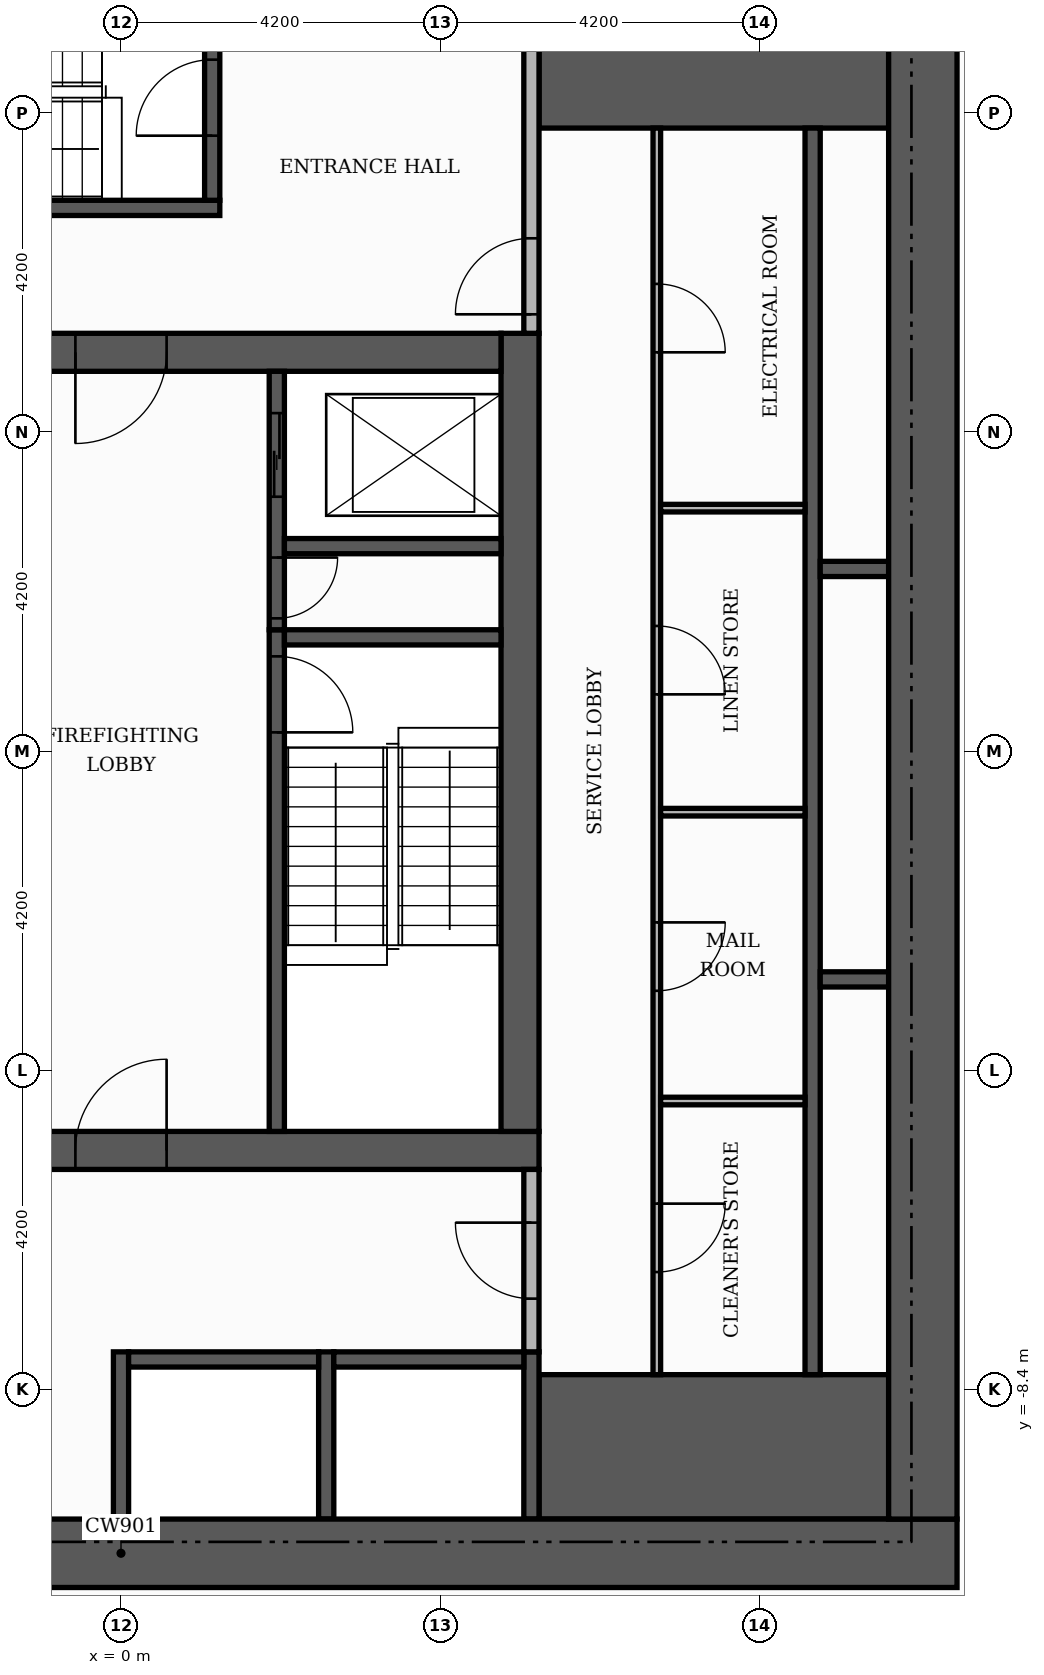
"""IFC4 building model, lengths in metres.
Left out: names, types, materials, properties, quantities, classifications, styles, units other than length and angle.
Written with IfcOpenShell. Run it as: python <this file> out.ifc"""

import sys

from ifc_helpers import new_model, si_unit, direction, frame, frame_2d, origin, place, context, subcontext, project, spatial, rectangle, extrude, element, fill, save


model = new_model("IFC4")
c1 = context("Model", 3, precision=1e-05, world=origin(), true_north=direction((0.0, 1.0)))
c2 = subcontext(c1, "Body", "Model", "MODEL_VIEW")
j1 = project(units=[si_unit("LENGTHUNIT", "METRE"), si_unit("PLANEANGLEUNIT", "RADIAN")], contexts=[c1])
p1 = place(None, origin())
s1 = spatial("IfcSite", under=j1, at=p1, CompositionType="ELEMENT")
p2 = place(p1, origin())
s2 = spatial("IfcBuilding", under=s1, at=p2, CompositionType="ELEMENT")
p3 = place(p2, frame((0.0, 0.0, 30.9)))
s3 = spatial("IfcBuildingStorey", under=s2, at=p3, CompositionType="ELEMENT", Elevation=30.9)
p4 = place(p3, frame((-5.5, -5.25, 0.0), z_axis=(0.0, 0.0, 1.0), x_axis=(1.0, 0.0, 0.0)))
e1 = element("IfcWall", 1, at=p4, inside=s3, PredefinedType="SHEAR", context=c2, shape_type="SweptSolid", body=[
    extrude(rectangle(XDim=11.0, YDim=0.5, at=frame_2d((5.5, 0.0))), origin(), (0.0, 0.0, 1.0), 3.48),
])
p5 = place(p4, frame((4.9, 0.0, 0.0)))
e2 = element("IfcOpeningElement", 2, at=p5, cuts=e1, PredefinedType="OPENING", context=c2, shape_type="SweptSolid", body=[
    extrude(rectangle(XDim=1.2, YDim=2.1, at=frame_2d((0.6, 1.05))), frame((0.0, 0.26, 0.0), z_axis=(0.0, -1.0, 0.0), x_axis=(1.0, 0.0, 0.0)), (0.0, 0.0, 1.0), 0.52),
])
p6 = place(p3, frame((5.25, -5.0, 0.0), z_axis=(0.0, 0.0, 1.0), x_axis=(0.0, 1.0, 0.0)))
e3 = element("IfcWall", 3, at=p6, inside=s3, PredefinedType="SHEAR", context=c2, shape_type="SweptSolid", body=[
    extrude(rectangle(XDim=10.5, YDim=0.5, at=frame_2d((5.25, 0.0))), origin(), (0.0, 0.0, 1.0), 3.48),
])
p7 = place(p3, frame((-5.0, 5.25, 0.0), z_axis=(0.0, 0.0, 1.0), x_axis=(1.0, 0.0, 0.0)))
e4 = element("IfcWall", 4, at=p7, inside=s3, PredefinedType="SHEAR", context=c2, shape_type="SweptSolid", body=[
    extrude(rectangle(XDim=10.0, YDim=0.5, at=frame_2d((5.0, 0.0))), origin(), (0.0, 0.0, 1.0), 3.48),
])
p8 = place(p7, frame((4.4, 0.0, 0.0)))
e5 = element("IfcOpeningElement", 5, at=p8, cuts=e4, PredefinedType="OPENING", context=c2, shape_type="SweptSolid", body=[
    extrude(rectangle(XDim=1.2, YDim=2.1, at=frame_2d((0.6, 1.05))), frame((0.0, 0.26, 0.0), z_axis=(0.0, -1.0, 0.0), x_axis=(1.0, 0.0, 0.0)), (0.0, 0.0, 1.0), 0.52),
])
for number, where, z_axis, x_axis in (
    (6, (5.5, -9.15, 0.0), (0.0, 0.0, 1.0), (1.0, 0.0, 0.0)),
    (7, (5.5, 9.15, 0.0), (0.0, 0.0, 1.0), (1.0, 0.0, 0.0)),
):
    element("IfcWall", number, at=place(p3, frame(where, z_axis=z_axis, x_axis=x_axis)), inside=s3, PredefinedType="SHEAR", context=c2, shape_type="SweptSolid", body=[
        extrude(rectangle(XDim=4.6, YDim=1.9, at=frame_2d((2.3, 0.0))), origin(), (0.0, 0.0, 1.0), 3.48),
    ])
p9 = place(p3, frame((2.05, -5.0, 0.0), z_axis=(0.0, 0.0, 1.0), x_axis=(0.0, 1.0, 0.0)))
e8 = element("IfcWall", 8, at=p9, inside=s3, PredefinedType="SHEAR", context=c2, shape_type="SweptSolid", body=[
    extrude(rectangle(XDim=6.6, YDim=0.2, at=frame_2d((3.3, 0.0))), origin(), (0.0, 0.0, 1.0), 3.48),
])
p10 = place(p9, frame((5.25, 0.0, 0.0)))
e9 = element("IfcOpeningElement", 9, at=p10, cuts=e8, PredefinedType="OPENING", context=c2, shape_type="SweptSolid", body=[
    extrude(rectangle(XDim=1.0, YDim=2.1, at=frame_2d((0.5, 1.05))), frame((0.0, 0.11, 0.0), z_axis=(0.0, -1.0, 0.0), x_axis=(1.0, 0.0, 0.0)), (0.0, 0.0, 1.0), 0.22),
])
p11 = place(p3, frame((2.15, 1.5, 0.0), z_axis=(0.0, 0.0, 1.0), x_axis=(1.0, 0.0, 0.0)))
e10 = element("IfcWall", 10, at=p11, inside=s3, PredefinedType="SHEAR", context=c2, shape_type="SweptSolid", body=[
    extrude(rectangle(XDim=2.85, YDim=0.2, at=frame_2d((1.425, 0.0))), origin(), (0.0, 0.0, 1.0), 3.48),
])
p12 = place(p3, frame((-5.5, 7.15, 0.0), z_axis=(0.0, 0.0, 1.0), x_axis=(1.0, 0.0, 0.0)))
e11 = element("IfcWall", 11, at=p12, inside=s3, PredefinedType="SHEAR", context=c2, shape_type="SweptSolid", body=[
    extrude(rectangle(XDim=6.8, YDim=0.2, at=frame_2d((3.4, 0.0))), origin(), (0.0, 0.0, 1.0), 3.48),
])
p13 = place(p3, frame((1.2, 7.25, 0.0), z_axis=(0.0, 0.0, 1.0), x_axis=(0.0, 1.0, 0.0)))
e12 = element("IfcWall", 12, at=p13, inside=s3, PredefinedType="SHEAR", context=c2, shape_type="SweptSolid", body=[
    extrude(rectangle(XDim=2.85, YDim=0.2, at=frame_2d((1.425, 0.0))), origin(), (0.0, 0.0, 1.0), 3.48),
])
p14 = place(p13, frame((0.85, 0.0, 0.0)))
e13 = element("IfcOpeningElement", 13, at=p14, cuts=e12, PredefinedType="OPENING", context=c2, shape_type="SweptSolid", body=[
    extrude(rectangle(XDim=1.0, YDim=2.1, at=frame_2d((0.5, 1.05))), frame((0.0, 0.11, 0.0), z_axis=(0.0, -1.0, 0.0), x_axis=(1.0, 0.0, 0.0)), (0.0, 0.0, 1.0), 0.22),
])
for number, where, z_axis, x_axis in (
    (14, (0.0, -10.1, 0.0), (0.0, 0.0, 1.0), (0.0, 1.0, 0.0)),
    (15, (2.7, -10.1, 0.0), (0.0, 0.0, 1.0), (0.0, 1.0, 0.0)),
    (16, (5.4, -10.1, 0.0), (0.0, 0.0, 1.0), (0.0, 1.0, 0.0)),
):
    element("IfcWall", number, at=place(p3, frame(where, z_axis=z_axis, x_axis=x_axis)), inside=s3, PredefinedType="SHEAR", context=c2, shape_type="SweptSolid", body=[
        extrude(rectangle(XDim=2.2, YDim=0.2, at=frame_2d((1.1, 0.0))), origin(), (0.0, 0.0, 1.0), 3.48),
    ])
p15 = place(p3, frame((9.1, -8.2, 0.0), z_axis=(0.0, 0.0, 1.0), x_axis=(0.0, 1.0, 0.0)))
e17 = element("IfcWall", 17, at=p15, inside=s3, PredefinedType="SHEAR", context=c2, shape_type="SweptSolid", body=[
    extrude(rectangle(XDim=16.4, YDim=0.2, at=frame_2d((8.2, 0.0))), origin(), (0.0, 0.0, 1.0), 3.48),
])
for number, where, z_axis, x_axis in (
    (18, (0.1, -8.0, 0.0), (0.0, 0.0, 1.0), (1.0, 0.0, 0.0)),
    (19, (2.8, -8.0, 0.0), (0.0, 0.0, 1.0), (1.0, 0.0, 0.0)),
):
    element("IfcWall", number, at=place(p3, frame(where, z_axis=z_axis, x_axis=x_axis)), inside=s3, PredefinedType="SHEAR", context=c2, shape_type="SweptSolid", body=[
        extrude(rectangle(XDim=2.5, YDim=0.2, at=frame_2d((1.25, 0.0))), origin(), (0.0, 0.0, 1.0), 3.48),
    ])
p16 = place(p3, frame((9.2, -3.0, 0.0), z_axis=(0.0, 0.0, 1.0), x_axis=(1.0, 0.0, 0.0)))
e20 = element("IfcWall", 20, at=p16, inside=s3, PredefinedType="SHEAR", context=c2, shape_type="SweptSolid", body=[
    extrude(rectangle(XDim=0.9, YDim=0.2, at=frame_2d((0.45, 0.0))), origin(), (0.0, 0.0, 1.0), 3.48),
])
p17 = place(p3, frame((2.05, 1.6, 0.0), z_axis=(0.0, 0.0, 1.0), x_axis=(0.0, 1.0, 0.0)))
e21 = element("IfcWall", 21, at=p17, inside=s3, PredefinedType="SHEAR", context=c2, shape_type="SweptSolid", body=[
    extrude(rectangle(XDim=3.4, YDim=0.2, at=frame_2d((1.7, 0.0))), origin(), (0.0, 0.0, 1.0), 3.48),
])
p18 = place(p17, frame((1.75, 0.0, 0.0)))
e22 = element("IfcOpeningElement", 22, at=p18, cuts=e21, PredefinedType="OPENING", context=c2, shape_type="SweptSolid", body=[
    extrude(rectangle(XDim=1.1, YDim=2.1, at=frame_2d((0.55, 1.05))), frame((0.0, 0.11, 0.0), z_axis=(0.0, -1.0, 0.0), x_axis=(1.0, 0.0, 0.0)), (0.0, 0.0, 1.0), 0.22),
])
p19 = place(p17, frame((0.15, 0.0, 0.0)))
e23 = element("IfcOpeningElement", 23, at=p19, cuts=e21, PredefinedType="OPENING", context=c2, shape_type="SweptSolid", body=[
    extrude(rectangle(XDim=0.8, YDim=2.1, at=frame_2d((0.4, 1.05))), frame((0.0, 0.11, 0.0), z_axis=(0.0, -1.0, 0.0), x_axis=(1.0, 0.0, 0.0)), (0.0, 0.0, 1.0), 0.22),
])
p20 = place(p3, frame((9.2, 2.4, 0.0), z_axis=(0.0, 0.0, 1.0), x_axis=(1.0, 0.0, 0.0)))
e24 = element("IfcWall", 24, at=p20, inside=s3, PredefinedType="SHEAR", context=c2, shape_type="SweptSolid", body=[
    extrude(rectangle(XDim=0.9, YDim=0.2, at=frame_2d((0.45, 0.0))), origin(), (0.0, 0.0, 1.0), 3.48),
])
p21 = place(p3, frame((2.15, 2.7, 0.0), z_axis=(0.0, 0.0, 1.0), x_axis=(1.0, 0.0, 0.0)))
e25 = element("IfcWall", 25, at=p21, inside=s3, PredefinedType="SHEAR", context=c2, shape_type="SweptSolid", body=[
    extrude(rectangle(XDim=2.85, YDim=0.2, at=frame_2d((1.425, 0.0))), origin(), (0.0, 0.0, 1.0), 3.48),
])
p22 = place(p3, frame((-11.0, -10.55, 0.0), z_axis=(0.0, 0.0, 1.0), x_axis=(1.0, 0.0, 0.0)))
e26 = element("IfcWall", 26, at=p22, inside=s3, PredefinedType="SHEAR", context=c2, shape_type="SweptSolid", body=[
    extrude(rectangle(XDim=22.0, YDim=0.9, at=frame_2d((11.0, 0.0))), origin(), (0.0, 0.0, 1.0), 3.48),
])
p23 = place(p22, frame((7.4, 0.0, 0.0)))
e27 = element("IfcOpeningElement", 27, at=p23, cuts=e26, PredefinedType="OPENING", context=c2, shape_type="SweptSolid", body=[
    extrude(rectangle(XDim=1.8, YDim=2.2, at=frame_2d((0.9, 1.1))), frame((0.0, 0.46, 0.0), z_axis=(0.0, -1.0, 0.0), x_axis=(1.0, 0.0, 0.0)), (0.0, 0.0, 1.0), 0.92),
])
p24 = place(p3, frame((10.55, -10.1, 0.0), z_axis=(0.0, 0.0, 1.0), x_axis=(0.0, 1.0, 0.0)))
e28 = element("IfcWall", 28, at=p24, inside=s3, PredefinedType="SHEAR", context=c2, shape_type="SweptSolid", body=[
    extrude(rectangle(XDim=20.2, YDim=0.9, at=frame_2d((10.1, 0.0))), origin(), (0.0, 0.0, 1.0), 3.48),
])
p25 = place(p3, frame((7.05, -8.2, 0.0), z_axis=(0.0, 0.0, 1.0), x_axis=(0.0, 1.0, 0.0)))
e29 = element("IfcWall", 29, at=p25, inside=s3, PredefinedType="PARTITIONING", context=c2, shape_type="SweptSolid", body=[
    extrude(rectangle(XDim=16.4, YDim=0.1, at=frame_2d((8.2, 0.0))), origin(), (0.0, 0.0, 1.0), 3.48),
])
p26 = place(p25, frame((1.35, 0.0, 0.0)))
e30 = element("IfcOpeningElement", 30, at=p26, cuts=e29, PredefinedType="OPENING", context=c2, shape_type="SweptSolid", body=[
    extrude(rectangle(XDim=0.9, YDim=2.1, at=frame_2d((0.45, 1.05))), frame((0.0, 0.06, 0.0), z_axis=(0.0, -1.0, 0.0), x_axis=(1.0, 0.0, 0.0)), (0.0, 0.0, 1.0), 0.12),
])
p27 = place(p25, frame((5.05, 0.0, 0.0)))
e31 = element("IfcOpeningElement", 31, at=p27, cuts=e29, PredefinedType="OPENING", context=c2, shape_type="SweptSolid", body=[
    extrude(rectangle(XDim=0.9, YDim=2.1, at=frame_2d((0.45, 1.05))), frame((0.0, 0.06, 0.0), z_axis=(0.0, -1.0, 0.0), x_axis=(1.0, 0.0, 0.0)), (0.0, 0.0, 1.0), 0.12),
])
p28 = place(p25, frame((8.95, 0.0, 0.0)))
e32 = element("IfcOpeningElement", 32, at=p28, cuts=e29, PredefinedType="OPENING", context=c2, shape_type="SweptSolid", body=[
    extrude(rectangle(XDim=0.9, YDim=2.1, at=frame_2d((0.45, 1.05))), frame((0.0, 0.06, 0.0), z_axis=(0.0, -1.0, 0.0), x_axis=(1.0, 0.0, 0.0)), (0.0, 0.0, 1.0), 0.12),
])
p29 = place(p25, frame((13.45, 0.0, 0.0)))
e33 = element("IfcOpeningElement", 33, at=p29, cuts=e29, PredefinedType="OPENING", context=c2, shape_type="SweptSolid", body=[
    extrude(rectangle(XDim=0.9, YDim=2.1, at=frame_2d((0.45, 1.05))), frame((0.0, 0.06, 0.0), z_axis=(0.0, -1.0, 0.0), x_axis=(1.0, 0.0, 0.0)), (0.0, 0.0, 1.0), 0.12),
])
p30 = place(p3, frame((5.4, -7.9, 0.0), z_axis=(0.0, 0.0, 1.0), x_axis=(0.0, 1.0, 0.0)))
e34 = element("IfcWall", 34, at=p30, inside=s3, PredefinedType="PARTITIONING", context=c2, shape_type="SweptSolid", body=[
    extrude(rectangle(XDim=2.4, YDim=0.2, at=frame_2d((1.2, 0.0))), origin(), (0.0, 0.0, 1.0), 3.48),
])
p31 = place(p30, frame((0.7, 0.0, 0.0)))
e35 = element("IfcOpeningElement", 35, at=p31, cuts=e34, PredefinedType="OPENING", context=c2, shape_type="SweptSolid", body=[
    extrude(rectangle(XDim=1.0, YDim=2.1, at=frame_2d((0.5, 1.05))), frame((0.0, 0.11, 0.0), z_axis=(0.0, -1.0, 0.0), x_axis=(1.0, 0.0, 0.0)), (0.0, 0.0, 1.0), 0.22),
])
for number, where, z_axis, x_axis in (
    (36, (7.1, -4.6, 0.0), (0.0, 0.0, 1.0), (1.0, 0.0, 0.0)),
    (37, (7.1, -0.8, 0.0), (0.0, 0.0, 1.0), (1.0, 0.0, 0.0)),
    (38, (7.1, 3.2, 0.0), (0.0, 0.0, 1.0), (1.0, 0.0, 0.0)),
):
    element("IfcWall", number, at=place(p3, frame(where, z_axis=z_axis, x_axis=x_axis)), inside=s3, PredefinedType="PARTITIONING", context=c2, shape_type="SweptSolid", body=[
        extrude(rectangle(XDim=1.9, YDim=0.1, at=frame_2d((0.95, 0.0))), origin(), (0.0, 0.0, 1.0), 3.48),
    ])
p32 = place(p3, frame((5.4, 5.5, 0.0), z_axis=(0.0, 0.0, 1.0), x_axis=(0.0, 1.0, 0.0)))
e39 = element("IfcWall", 39, at=p32, inside=s3, PredefinedType="PARTITIONING", context=c2, shape_type="SweptSolid", body=[
    extrude(rectangle(XDim=4.6, YDim=0.2, at=frame_2d((2.3, 0.0))), origin(), (0.0, 0.0, 1.0), 3.48),
])
p33 = place(p32, frame((0.25, 0.0, 0.0)))
e40 = element("IfcOpeningElement", 40, at=p33, cuts=e39, PredefinedType="OPENING", context=c2, shape_type="SweptSolid", body=[
    extrude(rectangle(XDim=1.0, YDim=2.1, at=frame_2d((0.5, 1.05))), frame((0.0, 0.11, 0.0), z_axis=(0.0, -1.0, 0.0), x_axis=(1.0, 0.0, 0.0)), (0.0, 0.0, 1.0), 0.22),
])
p34 = place(p18, origin())
e41 = element("IfcDoor", 41, at=p34, inside=s3, OperationType="SLIDING_TO_LEFT", PredefinedType="DOOR", context=c2, shape_type="SweptSolid", body=[
    extrude(rectangle(XDim=1.1, YDim=2.1, at=frame_2d((0.55, 1.05))), frame((0.0, 0.025, 0.0), z_axis=(0.0, -1.0, 0.0), x_axis=(1.0, 0.0, 0.0)), (0.0, 0.0, 1.0), 0.05),
])
fill(e22, e41)
p35 = place(p10, frame((1.0, 0.0, 0.0), z_axis=(0.0, 0.0, 1.0), x_axis=(-1.0, 0.0, 0.0)))
e42 = element("IfcDoor", 42, at=p35, inside=s3, OperationType="SINGLE_SWING_LEFT", PredefinedType="DOOR", context=c2, shape_type="SweptSolid", body=[
    extrude(rectangle(XDim=1.0, YDim=2.1, at=frame_2d((0.5, 1.05))), frame((0.0, 0.025, 0.0), z_axis=(0.0, -1.0, 0.0), x_axis=(1.0, 0.0, 0.0)), (0.0, 0.0, 1.0), 0.05),
])
fill(e9, e42)
p36 = place(p19, frame((0.8, 0.0, 0.0), z_axis=(0.0, 0.0, 1.0), x_axis=(-1.0, 0.0, 0.0)))
e43 = element("IfcDoor", 43, at=p36, inside=s3, OperationType="SINGLE_SWING_RIGHT", PredefinedType="DOOR", context=c2, shape_type="SweptSolid", body=[
    extrude(rectangle(XDim=0.8, YDim=2.1, at=frame_2d((0.4, 1.05))), frame((0.0, 0.025, 0.0), z_axis=(0.0, -1.0, 0.0), x_axis=(1.0, 0.0, 0.0)), (0.0, 0.0, 1.0), 0.05),
])
fill(e23, e43)
p37 = place(p8, frame((1.2, 0.0, 0.0), z_axis=(0.0, 0.0, 1.0), x_axis=(-1.0, 0.0, 0.0)))
e44 = element("IfcDoor", 44, at=p37, inside=s3, OperationType="SINGLE_SWING_LEFT", PredefinedType="DOOR", context=c2, shape_type="SweptSolid", body=[
    extrude(rectangle(XDim=1.2, YDim=2.1, at=frame_2d((0.6, 1.05))), frame((0.0, 0.025, 0.0), z_axis=(0.0, -1.0, 0.0), x_axis=(1.0, 0.0, 0.0)), (0.0, 0.0, 1.0), 0.05),
])
fill(e5, e44)
p38 = place(p5, origin())
e45 = element("IfcDoor", 45, at=p38, inside=s3, OperationType="SINGLE_SWING_RIGHT", PredefinedType="DOOR", context=c2, shape_type="SweptSolid", body=[
    extrude(rectangle(XDim=1.2, YDim=2.1, at=frame_2d((0.6, 1.05))), frame((0.0, 0.025, 0.0), z_axis=(0.0, -1.0, 0.0), x_axis=(1.0, 0.0, 0.0)), (0.0, 0.0, 1.0), 0.05),
])
fill(e2, e45)
p39 = place(p14, origin())
e46 = element("IfcDoor", 46, at=p39, inside=s3, OperationType="SINGLE_SWING_LEFT", PredefinedType="DOOR", context=c2, shape_type="SweptSolid", body=[
    extrude(rectangle(XDim=1.0, YDim=2.1, at=frame_2d((0.5, 1.05))), frame((0.0, 0.025, 0.0), z_axis=(0.0, -1.0, 0.0), x_axis=(1.0, 0.0, 0.0)), (0.0, 0.0, 1.0), 0.05),
])
fill(e13, e46)
p40 = place(p33, origin())
e47 = element("IfcDoor", 47, at=p40, inside=s3, OperationType="SINGLE_SWING_LEFT", PredefinedType="DOOR", context=c2, shape_type="SweptSolid", body=[
    extrude(rectangle(XDim=1.0, YDim=2.1, at=frame_2d((0.5, 1.05))), frame((0.0, 0.025, 0.0), z_axis=(0.0, -1.0, 0.0), x_axis=(1.0, 0.0, 0.0)), (0.0, 0.0, 1.0), 0.05),
])
fill(e40, e47)
p41 = place(p31, origin())
e48 = element("IfcDoor", 48, at=p41, inside=s3, OperationType="SINGLE_SWING_RIGHT", PredefinedType="DOOR", context=c2, shape_type="SweptSolid", body=[
    extrude(rectangle(XDim=1.0, YDim=2.1, at=frame_2d((0.5, 1.05))), frame((0.0, 0.025, 0.0), z_axis=(0.0, -1.0, 0.0), x_axis=(1.0, 0.0, 0.0)), (0.0, 0.0, 1.0), 0.05),
])
fill(e35, e48)
p42 = place(p26, frame((0.9, 0.0, 0.0), z_axis=(0.0, 0.0, 1.0), x_axis=(-1.0, 0.0, 0.0)))
e49 = element("IfcDoor", 49, at=p42, inside=s3, OperationType="SINGLE_SWING_RIGHT", PredefinedType="DOOR", context=c2, shape_type="SweptSolid", body=[
    extrude(rectangle(XDim=0.9, YDim=2.1, at=frame_2d((0.45, 1.05))), frame((0.0, 0.025, 0.0), z_axis=(0.0, -1.0, 0.0), x_axis=(1.0, 0.0, 0.0)), (0.0, 0.0, 1.0), 0.05),
])
fill(e30, e49)
p43 = place(p27, frame((0.9, 0.0, 0.0), z_axis=(0.0, 0.0, 1.0), x_axis=(-1.0, 0.0, 0.0)))
e50 = element("IfcDoor", 50, at=p43, inside=s3, OperationType="SINGLE_SWING_RIGHT", PredefinedType="DOOR", context=c2, shape_type="SweptSolid", body=[
    extrude(rectangle(XDim=0.9, YDim=2.1, at=frame_2d((0.45, 1.05))), frame((0.0, 0.025, 0.0), z_axis=(0.0, -1.0, 0.0), x_axis=(1.0, 0.0, 0.0)), (0.0, 0.0, 1.0), 0.05),
])
fill(e31, e50)
p44 = place(p28, frame((0.9, 0.0, 0.0), z_axis=(0.0, 0.0, 1.0), x_axis=(-1.0, 0.0, 0.0)))
e51 = element("IfcDoor", 51, at=p44, inside=s3, OperationType="SINGLE_SWING_LEFT", PredefinedType="DOOR", context=c2, shape_type="SweptSolid", body=[
    extrude(rectangle(XDim=0.9, YDim=2.1, at=frame_2d((0.45, 1.05))), frame((0.0, 0.025, 0.0), z_axis=(0.0, -1.0, 0.0), x_axis=(1.0, 0.0, 0.0)), (0.0, 0.0, 1.0), 0.05),
])
fill(e32, e51)
p45 = place(p29, frame((0.9, 0.0, 0.0), z_axis=(0.0, 0.0, 1.0), x_axis=(-1.0, 0.0, 0.0)))
e52 = element("IfcDoor", 52, at=p45, inside=s3, OperationType="SINGLE_SWING_LEFT", PredefinedType="DOOR", context=c2, shape_type="SweptSolid", body=[
    extrude(rectangle(XDim=0.9, YDim=2.1, at=frame_2d((0.45, 1.05))), frame((0.0, 0.025, 0.0), z_axis=(0.0, -1.0, 0.0), x_axis=(1.0, 0.0, 0.0)), (0.0, 0.0, 1.0), 0.05),
])
fill(e33, e52)
save(model, sys.argv[1])
